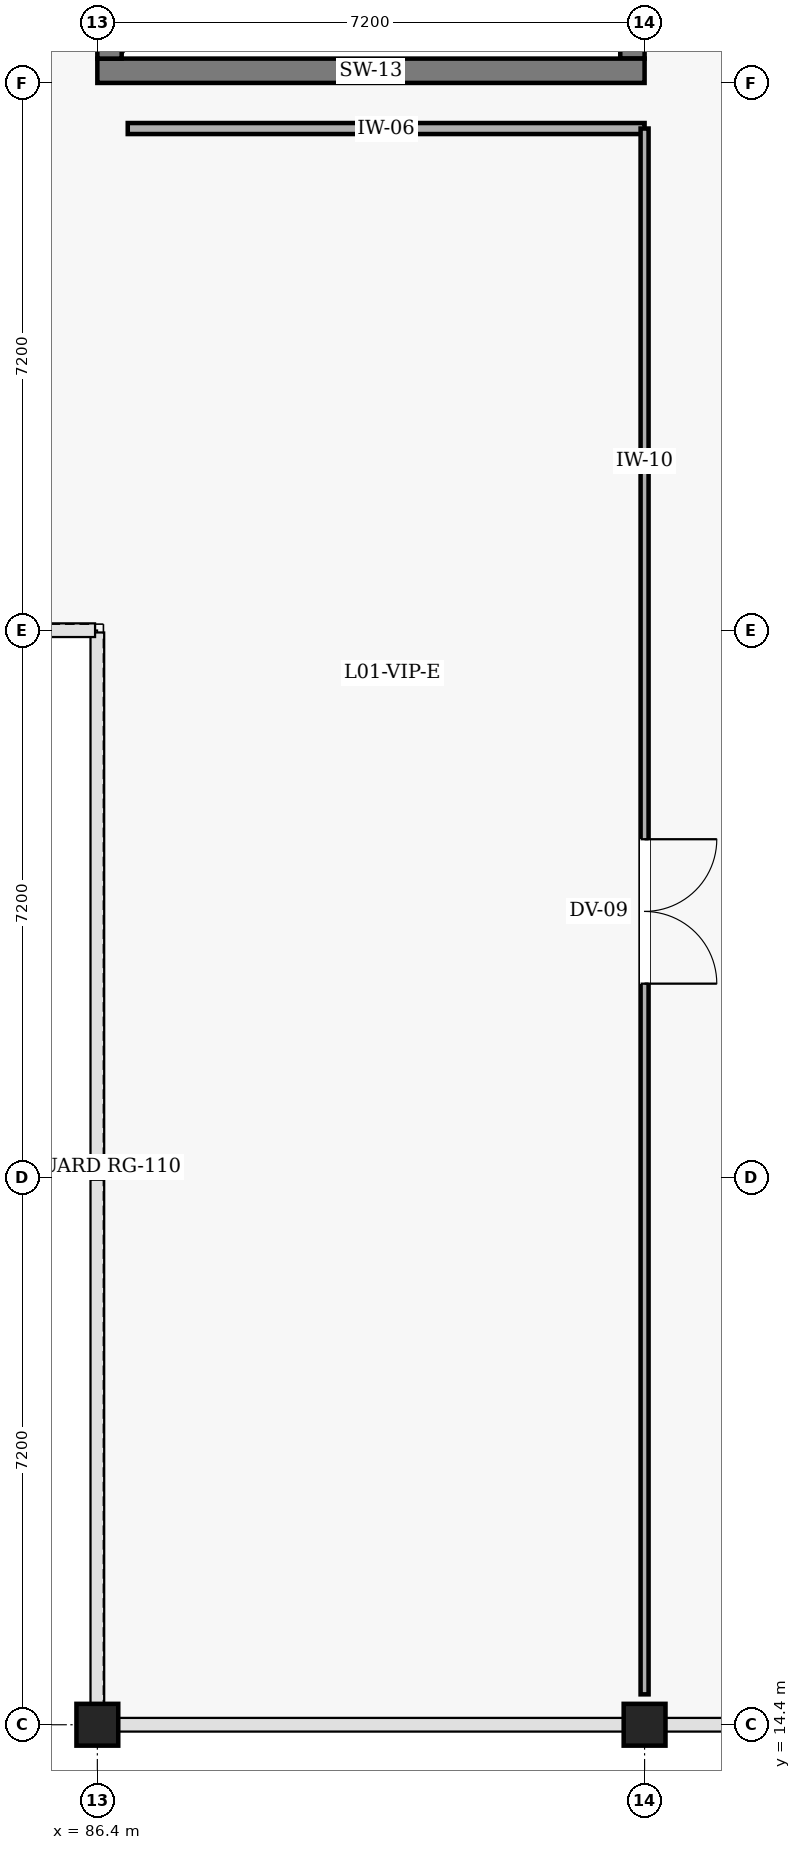
"""IFC4 building model, lengths in metres.
Left out: names, types, materials, properties, quantities, classifications, styles, units other than length and angle.
Written with IfcOpenShell. Run it as: python <this file> out.ifc"""

import sys

from ifc_helpers import new_model, si_unit, direction, frame, frame_2d, origin, origin_2d, place, context, subcontext, project, spatial, rectangle, extrude, element, fill, save


model = new_model("IFC4")
c1 = context("Model", 3, precision=1e-05, world=origin(), true_north=direction((0.0, 1.0)))
c2 = subcontext(c1, "Body", "Model", "MODEL_VIEW")
j1 = project(units=[si_unit("LENGTHUNIT", "METRE"), si_unit("PLANEANGLEUNIT", "RADIAN")], contexts=[c1])
p1 = place(None, origin())
s1 = spatial("IfcSite", under=j1, at=p1, CompositionType="ELEMENT")
p2 = place(p1, origin())
s2 = spatial("IfcBuilding", under=s1, at=p2, CompositionType="ELEMENT")
p3 = place(p2, frame((0.0, 0.0, 5.4)))
s3 = spatial("IfcBuildingStorey", under=s2, at=p3, CompositionType="ELEMENT", Elevation=5.4)
p4 = place(p3, frame((93.44, 50.08, 0.0), z_axis=(0.0, 0.0, 1.0), x_axis=(0.0, -1.0, 0.0)))
e1 = element("IfcWall", 1, at=p4, inside=s3, PredefinedType="SHEAR", context=c2, shape_type="SweptSolid", body=[
    extrude(rectangle(XDim=13.76, YDim=0.32, at=frame_2d((6.88, 0.0))), origin(), (0.0, 0.0, 1.0), 4.2),
])
p5 = place(p4, frame((2.3, 0.0, 0.0)))
e2 = element("IfcOpeningElement", 2, at=p5, cuts=e1, PredefinedType="OPENING", context=c2, shape_type="SweptSolid", body=[
    extrude(rectangle(XDim=1.25, YDim=2.2, at=frame_2d((0.625, 1.1))), frame((0.0, 0.17, 0.0), z_axis=(0.0, -1.0, 0.0), x_axis=(1.0, 0.0, 0.0)), (0.0, 0.0, 1.0), 0.34),
])
p6 = place(p3, frame((93.6, 36.16, 0.0), z_axis=(0.0, 0.0, 1.0), x_axis=(-1.0, 0.0, 0.0)))
e3 = element("IfcWall", 3, at=p6, inside=s3, PredefinedType="SHEAR", context=c2, shape_type="SweptSolid", body=[
    extrude(rectangle(XDim=7.2, YDim=0.32, at=frame_2d((3.6, 0.0))), origin(), (0.0, 0.0, 1.0), 4.2),
])
p7 = place(p3, frame((86.56, 36.32, 0.0), z_axis=(0.0, 0.0, 1.0), x_axis=(0.0, 1.0, 0.0)))
e4 = element("IfcWall", 4, at=p7, inside=s3, PredefinedType="SHEAR", context=c2, shape_type="SweptSolid", body=[
    extrude(rectangle(XDim=13.76, YDim=0.32, at=frame_2d((6.88, 0.0))), origin(), (0.0, 0.0, 1.0), 4.2),
])
for number, where, z_axis, x_axis in (
    (5, (86.4, 14.4, 0.0), (0.0, 0.0, 1.0), (1.0, 0.0, 0.0)),
    (6, (93.6, 14.4, 0.0), (0.0, 0.0, 1.0), (1.0, 0.0, 0.0)),
):
    element("IfcColumn", number, at=place(p3, frame(where, z_axis=z_axis, x_axis=x_axis)), inside=s3, PredefinedType="COLUMN", context=c2, shape_type="SweptSolid", body=[
        extrude(rectangle(XDim=0.55, YDim=0.55, at=origin_2d()), origin(), (0.0, 0.0, 1.0), 3.6),
    ])
p8 = place(p3, frame((86.8, 35.4, 0.0), z_axis=(0.0, 0.0, 1.0), x_axis=(1.0, 0.0, 0.0)))
e7 = element("IfcWall", 7, at=p8, inside=s3, PredefinedType="PARTITIONING", context=c2, shape_type="SweptSolid", body=[
    extrude(rectangle(XDim=6.8, YDim=0.145, at=frame_2d((3.4, 0.0))), origin(), (0.0, 0.0, 1.0), 3.85),
])
p9 = place(p3, frame((93.6, 35.4, 0.0), z_axis=(0.0, 0.0, 1.0), x_axis=(0.0, -1.0, 0.0)))
e8 = element("IfcWall", 8, at=p9, inside=s3, PredefinedType="PARTITIONING", context=c2, shape_type="SweptSolid", body=[
    extrude(rectangle(XDim=20.6, YDim=0.105, at=frame_2d((10.3, 0.0))), origin(), (0.0, 0.0, 1.0), 3.85),
])
p10 = place(p9, frame((9.35, 0.0, 0.0)))
e9 = element("IfcOpeningElement", 9, at=p10, cuts=e8, PredefinedType="OPENING", context=c2, shape_type="SweptSolid", body=[
    extrude(rectangle(XDim=1.9, YDim=2.3, at=frame_2d((0.95, 1.15))), frame((0.0, 0.062, 0.0), z_axis=(0.0, -1.0, 0.0), x_axis=(1.0, 0.0, 0.0)), (0.0, 0.0, 1.0), 0.125),
])
p11 = place(p10, origin())
e10 = element("IfcDoor", 10, at=p11, inside=s3, OperationType="DOUBLE_DOOR_SINGLE_SWING", PredefinedType="DOOR", context=c2, shape_type="SweptSolid", body=[
    extrude(rectangle(XDim=1.9, YDim=2.3, at=frame_2d((0.95, 1.15))), frame((0.0, 0.025, 0.0), z_axis=(0.0, -1.0, 0.0), x_axis=(1.0, 0.0, 0.0)), (0.0, 0.0, 1.0), 0.05),
])
fill(e9, e10)
save(model, sys.argv[1])
